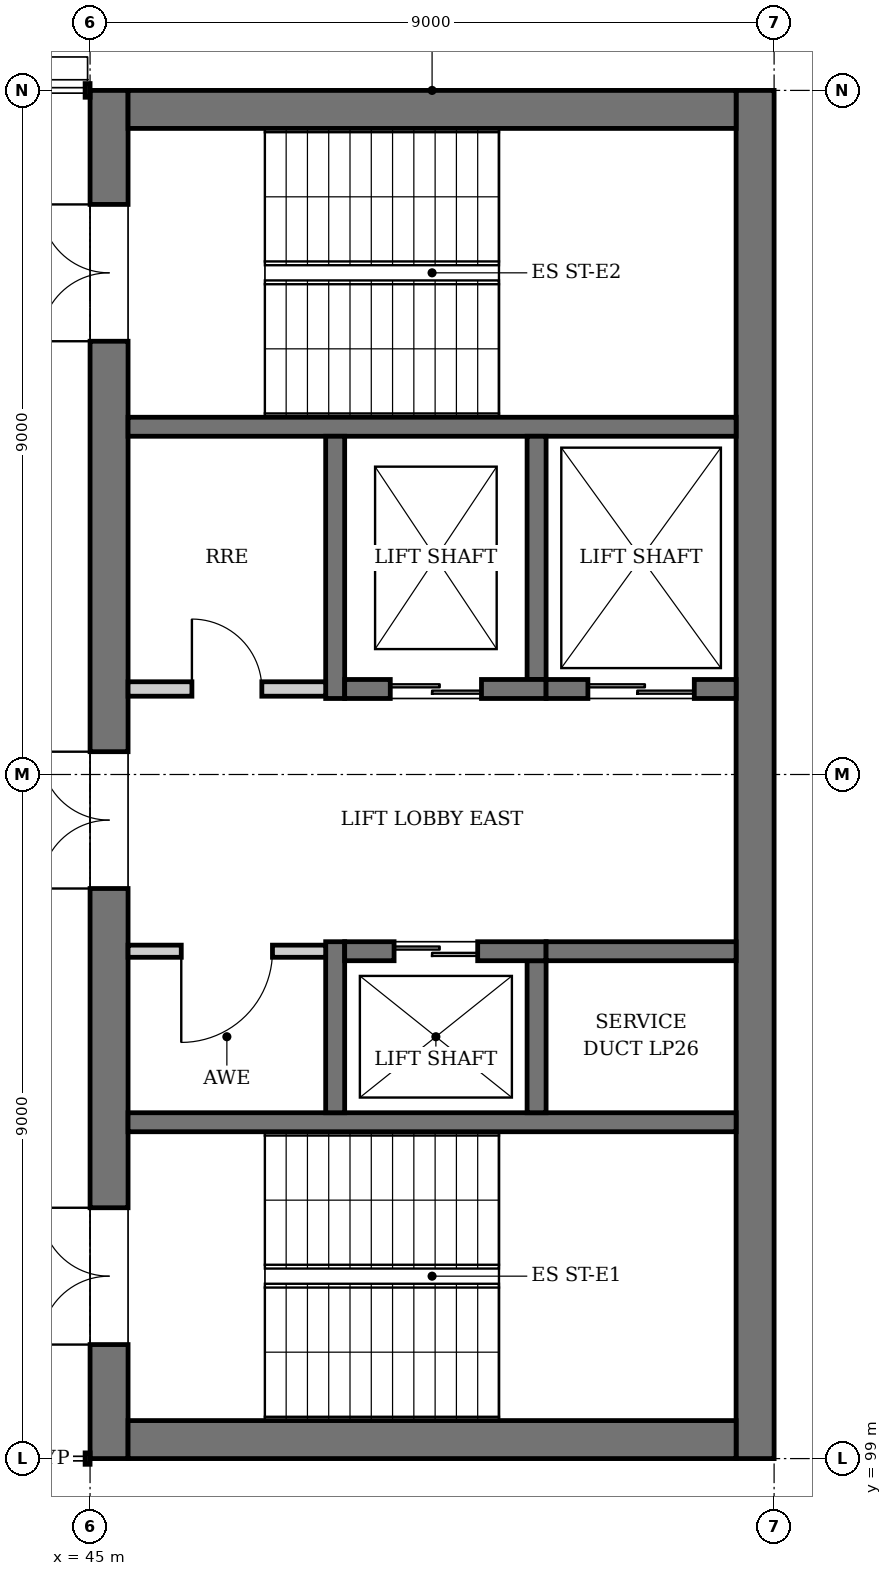
"""IFC4 building model, lengths in metres.
Left out: names, types, materials, properties, quantities, classifications, styles, units other than length and angle.
Written with IfcOpenShell. Run it as: python <this file> out.ifc"""

import sys

from ifc_helpers import new_model, si_unit, direction, frame, frame_2d, origin, place, context, subcontext, project, spatial, rectangle, extrude, element, fill, save


model = new_model("IFC4")
c1 = context("Model", 3, precision=1e-05, world=origin(), true_north=direction((0.0, 1.0)))
c2 = subcontext(c1, "Body", "Model", "MODEL_VIEW")
j1 = project(units=[si_unit("LENGTHUNIT", "METRE"), si_unit("PLANEANGLEUNIT", "RADIAN")], contexts=[c1])
p1 = place(None, origin())
s1 = spatial("IfcSite", under=j1, at=p1, CompositionType="ELEMENT")
p2 = place(p1, origin())
s2 = spatial("IfcBuilding", under=s1, at=p2, CompositionType="ELEMENT")
p3 = place(p2, frame((0.0, 0.0, 63.2)))
s3 = spatial("IfcBuildingStorey", under=s2, at=p3, CompositionType="ELEMENT", Elevation=63.2)
p4 = place(p3, frame((45.25, 99.0, 0.0), z_axis=(0.0, 0.0, 1.0), x_axis=(0.0, 1.0, 0.0)))
e1 = element("IfcWall", 1, at=p4, inside=s3, PredefinedType="SHEAR", context=c2, shape_type="SweptSolid", body=[
    extrude(rectangle(XDim=18.0, YDim=0.5, at=frame_2d((9.0, 0.0))), origin(), (0.0, 0.0, 1.0), 4.0),
])
p5 = place(p4, frame((1.5, 0.0, 0.0)))
e2 = element("IfcOpeningElement", 2, at=p5, cuts=e1, PredefinedType="OPENING", context=c2, shape_type="SweptSolid", body=[
    extrude(rectangle(XDim=1.8, YDim=2.1, at=frame_2d((0.9, 1.05))), frame((0.0, 0.26, 0.0), z_axis=(0.0, -1.0, 0.0), x_axis=(1.0, 0.0, 0.0)), (0.0, 0.0, 1.0), 0.52),
])
p6 = place(p4, frame((14.7, 0.0, 0.0)))
e3 = element("IfcOpeningElement", 3, at=p6, cuts=e1, PredefinedType="OPENING", context=c2, shape_type="SweptSolid", body=[
    extrude(rectangle(XDim=1.8, YDim=2.1, at=frame_2d((0.9, 1.05))), frame((0.0, 0.26, 0.0), z_axis=(0.0, -1.0, 0.0), x_axis=(1.0, 0.0, 0.0)), (0.0, 0.0, 1.0), 0.52),
])
p7 = place(p4, frame((7.5, 0.0, 0.0)))
e4 = element("IfcOpeningElement", 4, at=p7, cuts=e1, PredefinedType="OPENING", context=c2, shape_type="SweptSolid", body=[
    extrude(rectangle(XDim=1.8, YDim=2.1, at=frame_2d((0.9, 1.05))), frame((0.0, 0.26, 0.0), z_axis=(0.0, -1.0, 0.0), x_axis=(1.0, 0.0, 0.0)), (0.0, 0.0, 1.0), 0.52),
])
p8 = place(p3, frame((53.75, 99.0, 0.0), z_axis=(0.0, 0.0, 1.0), x_axis=(0.0, 1.0, 0.0)))
e5 = element("IfcWall", 5, at=p8, inside=s3, PredefinedType="SHEAR", context=c2, shape_type="SweptSolid", body=[
    extrude(rectangle(XDim=18.0, YDim=0.5, at=frame_2d((9.0, 0.0))), origin(), (0.0, 0.0, 1.0), 4.0),
])
for number, where, z_axis, x_axis in (
    (6, (45.5, 99.25, 0.0), (0.0, 0.0, 1.0), (1.0, 0.0, 0.0)),
    (7, (45.5, 116.75, 0.0), (0.0, 0.0, 1.0), (1.0, 0.0, 0.0)),
):
    element("IfcWall", number, at=place(p3, frame(where, z_axis=z_axis, x_axis=x_axis)), inside=s3, PredefinedType="SHEAR", context=c2, shape_type="SweptSolid", body=[
        extrude(rectangle(XDim=8.0, YDim=0.5, at=frame_2d((4.0, 0.0))), origin(), (0.0, 0.0, 1.0), 4.0),
    ])
for number, where, z_axis, x_axis in (
    (8, (45.5, 103.425, 0.0), (0.0, 0.0, 1.0), (1.0, 0.0, 0.0)),
    (9, (45.5, 112.575, 0.0), (0.0, 0.0, 1.0), (1.0, 0.0, 0.0)),
):
    element("IfcWall", number, at=place(p3, frame(where, z_axis=z_axis, x_axis=x_axis)), inside=s3, PredefinedType="SOLIDWALL", context=c2, shape_type="SweptSolid", body=[
        extrude(rectangle(XDim=8.0, YDim=0.25, at=frame_2d((4.0, 0.0))), origin(), (0.0, 0.0, 1.0), 3.75),
    ])
p9 = place(p3, frame((48.225, 103.55, 0.0), z_axis=(0.0, 0.0, 1.0), x_axis=(0.0, 1.0, 0.0)))
e10 = element("IfcWall", 10, at=p9, inside=s3, PredefinedType="SOLIDWALL", context=c2, shape_type="SweptSolid", body=[
    extrude(rectangle(XDim=2.25, YDim=0.25, at=frame_2d((1.125, 0.0))), origin(), (0.0, 0.0, 1.0), 4.0),
])
p10 = place(p3, frame((50.875, 103.55, 0.0), z_axis=(0.0, 0.0, 1.0), x_axis=(0.0, 1.0, 0.0)))
e11 = element("IfcWall", 11, at=p10, inside=s3, PredefinedType="SOLIDWALL", context=c2, shape_type="SweptSolid", body=[
    extrude(rectangle(XDim=2.0, YDim=0.25, at=frame_2d((1.0, 0.0))), origin(), (0.0, 0.0, 1.0), 4.0),
])
p11 = place(p3, frame((48.35, 105.675, 0.0), z_axis=(0.0, 0.0, 1.0), x_axis=(1.0, 0.0, 0.0)))
e12 = element("IfcWall", 12, at=p11, inside=s3, PredefinedType="SOLIDWALL", context=c2, shape_type="SweptSolid", body=[
    extrude(rectangle(XDim=2.65, YDim=0.25, at=frame_2d((1.325, 0.0))), origin(), (0.0, 0.0, 1.0), 4.0),
])
p12 = place(p11, frame((0.65, 0.0, 0.0)))
e13 = element("IfcOpeningElement", 13, at=p12, cuts=e12, PredefinedType="OPENING", context=c2, shape_type="SweptSolid", body=[
    extrude(rectangle(XDim=1.1, YDim=2.1, at=frame_2d((0.55, 1.05))), frame((0.0, 0.135, 0.0), z_axis=(0.0, -1.0, 0.0), x_axis=(1.0, 0.0, 0.0)), (0.0, 0.0, 1.0), 0.27),
])
p13 = place(p3, frame((51.0, 105.675, 0.0), z_axis=(0.0, 0.0, 1.0), x_axis=(1.0, 0.0, 0.0)))
e14 = element("IfcWall", 14, at=p13, inside=s3, PredefinedType="SOLIDWALL", context=c2, shape_type="SweptSolid", body=[
    extrude(rectangle(XDim=2.5, YDim=0.25, at=frame_2d((1.25, 0.0))), origin(), (0.0, 0.0, 1.0), 4.0),
])
p14 = place(p3, frame((48.225, 109.0, 0.0), z_axis=(0.0, 0.0, 1.0), x_axis=(0.0, 1.0, 0.0)))
e15 = element("IfcWall", 15, at=p14, inside=s3, PredefinedType="SOLIDWALL", context=c2, shape_type="SweptSolid", body=[
    extrude(rectangle(XDim=3.45, YDim=0.25, at=frame_2d((1.725, 0.0))), origin(), (0.0, 0.0, 1.0), 4.0),
])
p15 = place(p3, frame((50.875, 109.25, 0.0), z_axis=(0.0, 0.0, 1.0), x_axis=(0.0, 1.0, 0.0)))
e16 = element("IfcWall", 16, at=p15, inside=s3, PredefinedType="SOLIDWALL", context=c2, shape_type="SweptSolid", body=[
    extrude(rectangle(XDim=3.2, YDim=0.25, at=frame_2d((1.6, 0.0))), origin(), (0.0, 0.0, 1.0), 4.0),
])
p16 = place(p3, frame((48.35, 109.125, 0.0), z_axis=(0.0, 0.0, 1.0), x_axis=(1.0, 0.0, 0.0)))
e17 = element("IfcWall", 17, at=p16, inside=s3, PredefinedType="SOLIDWALL", context=c2, shape_type="SweptSolid", body=[
    extrude(rectangle(XDim=2.65, YDim=0.25, at=frame_2d((1.325, 0.0))), origin(), (0.0, 0.0, 1.0), 4.0),
])
p17 = place(p16, frame((0.6, 0.0, 0.0)))
e18 = element("IfcOpeningElement", 18, at=p17, cuts=e17, PredefinedType="OPENING", context=c2, shape_type="SweptSolid", body=[
    extrude(rectangle(XDim=1.2, YDim=2.1, at=frame_2d((0.6, 1.05))), frame((0.0, 0.135, 0.0), z_axis=(0.0, -1.0, 0.0), x_axis=(1.0, 0.0, 0.0)), (0.0, 0.0, 1.0), 0.27),
])
p18 = place(p3, frame((51.0, 109.125, 0.0), z_axis=(0.0, 0.0, 1.0), x_axis=(1.0, 0.0, 0.0)))
e19 = element("IfcWall", 19, at=p18, inside=s3, PredefinedType="SOLIDWALL", context=c2, shape_type="SweptSolid", body=[
    extrude(rectangle(XDim=2.5, YDim=0.25, at=frame_2d((1.25, 0.0))), origin(), (0.0, 0.0, 1.0), 4.0),
])
p19 = place(p18, frame((0.55, 0.0, 0.0)))
e20 = element("IfcOpeningElement", 20, at=p19, cuts=e19, PredefinedType="OPENING", context=c2, shape_type="SweptSolid", body=[
    extrude(rectangle(XDim=1.4, YDim=2.4, at=frame_2d((0.7, 1.2))), frame((0.0, 0.135, 0.0), z_axis=(0.0, -1.0, 0.0), x_axis=(1.0, 0.0, 0.0)), (0.0, 0.0, 1.0), 0.27),
])
p20 = place(p3, frame((45.5, 105.675, 0.0), z_axis=(0.0, 0.0, 1.0), x_axis=(1.0, 0.0, 0.0)))
e21 = element("IfcWall", 21, at=p20, inside=s3, PredefinedType="PARTITIONING", context=c2, shape_type="SweptSolid", body=[
    extrude(rectangle(XDim=2.6, YDim=0.16, at=frame_2d((1.3, 0.0))), origin(), (0.0, 0.0, 1.0), 3.75),
])
p21 = place(p20, frame((0.7, 0.0, 0.0)))
e22 = element("IfcOpeningElement", 22, at=p21, cuts=e21, PredefinedType="OPENING", context=c2, shape_type="SweptSolid", body=[
    extrude(rectangle(XDim=1.2, YDim=2.1, at=frame_2d((0.6, 1.05))), frame((0.0, 0.09, 0.0), z_axis=(0.0, -1.0, 0.0), x_axis=(1.0, 0.0, 0.0)), (0.0, 0.0, 1.0), 0.18),
])
p22 = place(p3, frame((45.5, 109.125, 0.0), z_axis=(0.0, 0.0, 1.0), x_axis=(1.0, 0.0, 0.0)))
e23 = element("IfcWall", 23, at=p22, inside=s3, PredefinedType="PARTITIONING", context=c2, shape_type="SweptSolid", body=[
    extrude(rectangle(XDim=2.6, YDim=0.19, at=frame_2d((1.3, 0.0))), origin(), (0.0, 0.0, 1.0), 3.75),
])
p23 = place(p22, frame((0.84, 0.0, 0.0)))
e24 = element("IfcOpeningElement", 24, at=p23, cuts=e23, PredefinedType="OPENING", context=c2, shape_type="SweptSolid", body=[
    extrude(rectangle(XDim=0.92, YDim=2.1, at=frame_2d((0.46, 1.05))), frame((0.0, 0.105, 0.0), z_axis=(0.0, -1.0, 0.0), x_axis=(1.0, 0.0, 0.0)), (0.0, 0.0, 1.0), 0.21),
])
p24 = place(p12, origin())
e25 = element("IfcDoor", 25, at=p24, inside=s3, OperationType="DOUBLE_DOOR_SLIDING", PredefinedType="DOOR", context=c2, shape_type="SweptSolid", body=[
    extrude(rectangle(XDim=1.1, YDim=2.1, at=frame_2d((0.55, 1.05))), frame((0.0, 0.025, 0.0), z_axis=(0.0, -1.0, 0.0), x_axis=(1.0, 0.0, 0.0)), (0.0, 0.0, 1.0), 0.05),
])
fill(e13, e25)
p25 = place(p17, origin())
e26 = element("IfcDoor", 26, at=p25, inside=s3, OperationType="DOUBLE_DOOR_SLIDING", PredefinedType="DOOR", context=c2, shape_type="SweptSolid", body=[
    extrude(rectangle(XDim=1.2, YDim=2.1, at=frame_2d((0.6, 1.05))), frame((0.0, 0.025, 0.0), z_axis=(0.0, -1.0, 0.0), x_axis=(1.0, 0.0, 0.0)), (0.0, 0.0, 1.0), 0.05),
])
fill(e18, e26)
p26 = place(p19, origin())
e27 = element("IfcDoor", 27, at=p26, inside=s3, OperationType="DOUBLE_DOOR_SLIDING", PredefinedType="DOOR", context=c2, shape_type="SweptSolid", body=[
    extrude(rectangle(XDim=1.4, YDim=2.4, at=frame_2d((0.7, 1.2))), frame((0.0, 0.025, 0.0), z_axis=(0.0, -1.0, 0.0), x_axis=(1.0, 0.0, 0.0)), (0.0, 0.0, 1.0), 0.05),
])
fill(e20, e27)
p27 = place(p5, origin())
e28 = element("IfcDoor", 28, at=p27, inside=s3, OperationType="DOUBLE_DOOR_SINGLE_SWING", PredefinedType="DOOR", context=c2, shape_type="SweptSolid", body=[
    extrude(rectangle(XDim=1.8, YDim=2.1, at=frame_2d((0.9, 1.05))), frame((0.0, 0.025, 0.0), z_axis=(0.0, -1.0, 0.0), x_axis=(1.0, 0.0, 0.0)), (0.0, 0.0, 1.0), 0.05),
])
fill(e2, e28)
p28 = place(p6, origin())
e29 = element("IfcDoor", 29, at=p28, inside=s3, OperationType="DOUBLE_DOOR_SINGLE_SWING", PredefinedType="DOOR", context=c2, shape_type="SweptSolid", body=[
    extrude(rectangle(XDim=1.8, YDim=2.1, at=frame_2d((0.9, 1.05))), frame((0.0, 0.025, 0.0), z_axis=(0.0, -1.0, 0.0), x_axis=(1.0, 0.0, 0.0)), (0.0, 0.0, 1.0), 0.05),
])
fill(e3, e29)
p29 = place(p7, origin())
e30 = element("IfcDoor", 30, at=p29, inside=s3, OperationType="DOUBLE_DOOR_SINGLE_SWING", PredefinedType="DOOR", context=c2, shape_type="SweptSolid", body=[
    extrude(rectangle(XDim=1.8, YDim=2.1, at=frame_2d((0.9, 1.05))), frame((0.0, 0.025, 0.0), z_axis=(0.0, -1.0, 0.0), x_axis=(1.0, 0.0, 0.0)), (0.0, 0.0, 1.0), 0.05),
])
fill(e4, e30)
p30 = place(p21, frame((1.2, 0.0, 0.0), z_axis=(0.0, 0.0, 1.0), x_axis=(-1.0, 0.0, 0.0)))
e31 = element("IfcDoor", 31, at=p30, inside=s3, OperationType="SINGLE_SWING_RIGHT", PredefinedType="DOOR", context=c2, shape_type="SweptSolid", body=[
    extrude(rectangle(XDim=1.2, YDim=2.1, at=frame_2d((0.6, 1.05))), frame((0.0, 0.025, 0.0), z_axis=(0.0, -1.0, 0.0), x_axis=(1.0, 0.0, 0.0)), (0.0, 0.0, 1.0), 0.05),
])
fill(e22, e31)
p31 = place(p23, origin())
e32 = element("IfcDoor", 32, at=p31, inside=s3, OperationType="SINGLE_SWING_LEFT", PredefinedType="DOOR", context=c2, shape_type="SweptSolid", body=[
    extrude(rectangle(XDim=0.92, YDim=2.1, at=frame_2d((0.46, 1.05))), frame((0.0, 0.025, 0.0), z_axis=(0.0, -1.0, 0.0), x_axis=(1.0, 0.0, 0.0)), (0.0, 0.0, 1.0), 0.05),
])
fill(e24, e32)
save(model, sys.argv[1])
